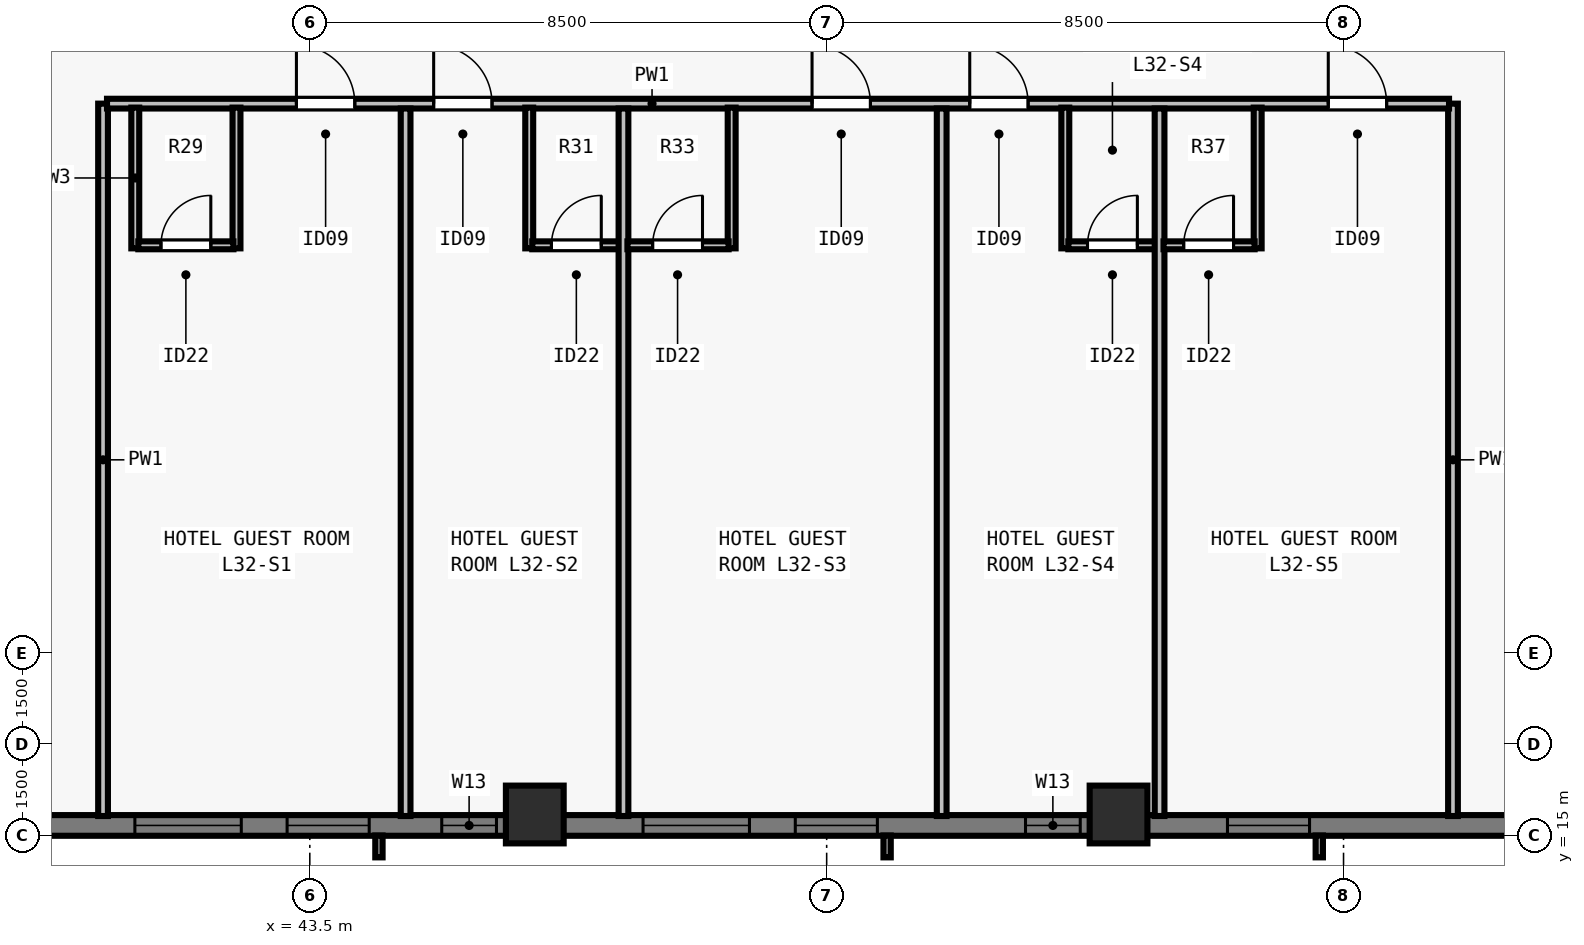
"""IFC4 building model, lengths in metres.
Left out: names, types, materials, properties, quantities, classifications, styles, units other than length and angle.
Written with IfcOpenShell. Run it as: python <this file> out.ifc"""

import sys

from ifc_helpers import new_model, si_unit, direction, frame, frame_2d, origin, origin_2d, place, context, subcontext, project, spatial, rectangle, extrude, element, fill, save


model = new_model("IFC4")
c1 = context("Model", 3, precision=1e-05, world=origin(), true_north=direction((0.0, 1.0)))
c2 = subcontext(c1, "Body", "Model", "MODEL_VIEW")
j1 = project(units=[si_unit("LENGTHUNIT", "METRE"), si_unit("PLANEANGLEUNIT", "RADIAN")], contexts=[c1])
p1 = place(None, origin())
s1 = spatial("IfcSite", under=j1, at=p1, CompositionType="ELEMENT")
p2 = place(p1, origin())
s2 = spatial("IfcBuilding", under=s1, at=p2, CompositionType="ELEMENT")
p3 = place(p2, frame((0.0, 0.0, 120.0)))
s3 = spatial("IfcBuildingStorey", under=s2, at=p3, CompositionType="ELEMENT", Elevation=120.0)
for number, where, z_axis, x_axis in (
    (1, (47.2, 15.35, 0.0), (0.0, 0.0, 1.0), (1.0, 0.0, 0.0)),
    (2, (56.8, 15.35, 0.0), (0.0, 0.0, 1.0), (1.0, 0.0, 0.0)),
):
    element("IfcColumn", number, at=place(p3, frame(where, z_axis=z_axis, x_axis=x_axis)), inside=s3, PredefinedType="COLUMN", context=c2, shape_type="SweptSolid", body=[
        extrude(rectangle(XDim=0.95, YDim=0.95, at=origin_2d()), origin(), (0.0, 0.0, 1.0), 3.5),
    ])
p4 = place(p3, frame((72.0, 15.17, 0.0), z_axis=(0.0, 0.0, 1.0), x_axis=(-1.0, 0.0, 0.0)))
e3 = element("IfcWall", 3, at=p4, inside=s3, PredefinedType="SOLIDWALL", context=c2, shape_type="SweptSolid", body=[
    extrude(rectangle(XDim=39.682, YDim=0.34, at=frame_2d((19.841, 0.0))), origin(), (0.0, 0.0, 1.0), 3.28),
])
p5 = place(p4, frame((5.802, 0.0, 0.8)))
e4 = element("IfcOpeningElement", 4, at=p5, cuts=e3, PredefinedType="OPENING", context=c2, shape_type="SweptSolid", body=[
    extrude(rectangle(XDim=1.35, YDim=1.66, at=frame_2d((0.675, 0.83))), frame((0.0, 0.18, 0.0), z_axis=(0.0, -1.0, 0.0), x_axis=(1.0, 0.0, 0.0)), (0.0, 0.0, 1.0), 0.36),
])
p6 = place(p4, frame((12.059, 0.0, 0.8)))
e5 = element("IfcOpeningElement", 5, at=p6, cuts=e3, PredefinedType="OPENING", context=c2, shape_type="SweptSolid", body=[
    extrude(rectangle(XDim=1.35, YDim=1.66, at=frame_2d((0.675, 0.83))), frame((0.0, 0.18, 0.0), z_axis=(0.0, -1.0, 0.0), x_axis=(1.0, 0.0, 0.0)), (0.0, 0.0, 1.0), 0.36),
])
p7 = place(p4, frame((19.166, 0.0, 0.8)))
e6 = element("IfcOpeningElement", 6, at=p7, cuts=e3, PredefinedType="OPENING", context=c2, shape_type="SweptSolid", body=[
    extrude(rectangle(XDim=1.35, YDim=1.66, at=frame_2d((0.675, 0.83))), frame((0.0, 0.18, 0.0), z_axis=(0.0, -1.0, 0.0), x_axis=(1.0, 0.0, 0.0)), (0.0, 0.0, 1.0), 0.36),
])
p8 = place(p4, frame((21.27, 0.0, 0.8)))
e7 = element("IfcOpeningElement", 7, at=p8, cuts=e3, PredefinedType="OPENING", context=c2, shape_type="SweptSolid", body=[
    extrude(rectangle(XDim=1.75, YDim=1.66, at=frame_2d((0.875, 0.83))), frame((0.0, 0.18, 0.0), z_axis=(0.0, -1.0, 0.0), x_axis=(1.0, 0.0, 0.0)), (0.0, 0.0, 1.0), 0.36),
])
p9 = place(p4, frame((27.523, 0.0, 0.8)))
e8 = element("IfcOpeningElement", 8, at=p9, cuts=e3, PredefinedType="OPENING", context=c2, shape_type="SweptSolid", body=[
    extrude(rectangle(XDim=1.35, YDim=1.66, at=frame_2d((0.675, 0.83))), frame((0.0, 0.18, 0.0), z_axis=(0.0, -1.0, 0.0), x_axis=(1.0, 0.0, 0.0)), (0.0, 0.0, 1.0), 0.36),
])
p10 = place(p4, frame((29.627, 0.0, 0.8)))
e9 = element("IfcOpeningElement", 9, at=p10, cuts=e3, PredefinedType="OPENING", context=c2, shape_type="SweptSolid", body=[
    extrude(rectangle(XDim=1.75, YDim=1.66, at=frame_2d((0.875, 0.83))), frame((0.0, 0.18, 0.0), z_axis=(0.0, -1.0, 0.0), x_axis=(1.0, 0.0, 0.0)), (0.0, 0.0, 1.0), 0.36),
])
p11 = place(p4, frame((25.43, 0.0, 0.8)))
e10 = element("IfcOpeningElement", 10, at=p11, cuts=e3, PredefinedType="OPENING", context=c2, shape_type="SweptSolid", body=[
    extrude(rectangle(XDim=0.9, YDim=1.66, at=frame_2d((0.45, 0.83))), frame((0.0, 0.18, 0.0), z_axis=(0.0, -1.0, 0.0), x_axis=(1.0, 0.0, 0.0)), (0.0, 0.0, 1.0), 0.36),
])
p12 = place(p4, frame((15.83, 0.0, 0.8)))
e11 = element("IfcOpeningElement", 11, at=p12, cuts=e3, PredefinedType="OPENING", context=c2, shape_type="SweptSolid", body=[
    extrude(rectangle(XDim=0.9, YDim=1.66, at=frame_2d((0.45, 0.83))), frame((0.0, 0.18, 0.0), z_axis=(0.0, -1.0, 0.0), x_axis=(1.0, 0.0, 0.0)), (0.0, 0.0, 1.0), 0.36),
])
p13 = place(p4, frame((34.39, 0.0, 0.8)))
e12 = element("IfcOpeningElement", 12, at=p13, cuts=e3, PredefinedType="OPENING", context=c2, shape_type="SweptSolid", body=[
    extrude(rectangle(XDim=0.9, YDim=1.66, at=frame_2d((0.45, 0.83))), frame((0.0, 0.18, 0.0), z_axis=(0.0, -1.0, 0.0), x_axis=(1.0, 0.0, 0.0)), (0.0, 0.0, 1.0), 0.36),
])
p14 = place(p3, frame((40.1, 15.325, 0.0), z_axis=(0.0, 0.0, 1.0), x_axis=(0.0, 1.0, 0.0)))
e13 = element("IfcWall", 13, at=p14, inside=s3, PredefinedType="PARTITIONING", context=c2, shape_type="SweptSolid", body=[
    extrude(rectangle(XDim=11.715, YDim=0.16, at=frame_2d((5.857, 0.0))), origin(), (0.0, 0.0, 1.0), 2.555),
])
p15 = place(p3, frame((62.3, 15.325, 0.0), z_axis=(0.0, 0.0, 1.0), x_axis=(0.0, 1.0, 0.0)))
e14 = element("IfcWall", 14, at=p15, inside=s3, PredefinedType="PARTITIONING", context=c2, shape_type="SweptSolid", body=[
    extrude(rectangle(XDim=11.715, YDim=0.16, at=frame_2d((5.857, 0.0))), origin(), (0.0, 0.0, 1.0), 3.28),
])
p16 = place(p3, frame((40.165, 27.04, 0.0), z_axis=(0.0, 0.0, 1.0), x_axis=(1.0, 0.0, 0.0)))
e15 = element("IfcWall", 15, at=p16, inside=s3, PredefinedType="PARTITIONING", context=c2, shape_type="SweptSolid", body=[
    extrude(rectangle(XDim=22.07, YDim=0.16, at=frame_2d((11.035, 0.0))), origin(), (0.0, 0.0, 1.0), 3.28),
])
p17 = place(p16, frame((3.115, 0.0, 0.0)))
e16 = element("IfcOpeningElement", 16, at=p17, cuts=e15, PredefinedType="OPENING", context=c2, shape_type="SweptSolid", body=[
    extrude(rectangle(XDim=0.96, YDim=2.15, at=frame_2d((0.48, 1.075))), frame((0.0, 0.09, 0.0), z_axis=(0.0, -1.0, 0.0), x_axis=(1.0, 0.0, 0.0)), (0.0, 0.0, 1.0), 0.18),
])
p18 = place(p16, frame((5.372, 0.0, 0.0)))
e17 = element("IfcOpeningElement", 17, at=p18, cuts=e15, PredefinedType="OPENING", context=c2, shape_type="SweptSolid", body=[
    extrude(rectangle(XDim=0.96, YDim=2.15, at=frame_2d((0.48, 1.075))), frame((0.0, 0.09, 0.0), z_axis=(0.0, -1.0, 0.0), x_axis=(1.0, 0.0, 0.0)), (0.0, 0.0, 1.0), 0.18),
])
p19 = place(p16, frame((11.594, 0.0, 0.0)))
e18 = element("IfcOpeningElement", 18, at=p19, cuts=e15, PredefinedType="OPENING", context=c2, shape_type="SweptSolid", body=[
    extrude(rectangle(XDim=0.96, YDim=2.15, at=frame_2d((0.48, 1.075))), frame((0.0, 0.09, 0.0), z_axis=(0.0, -1.0, 0.0), x_axis=(1.0, 0.0, 0.0)), (0.0, 0.0, 1.0), 0.18),
])
p20 = place(p16, frame((14.188, 0.0, 0.0)))
e19 = element("IfcOpeningElement", 19, at=p20, cuts=e15, PredefinedType="OPENING", context=c2, shape_type="SweptSolid", body=[
    extrude(rectangle(XDim=0.96, YDim=2.15, at=frame_2d((0.48, 1.075))), frame((0.0, 0.09, 0.0), z_axis=(0.0, -1.0, 0.0), x_axis=(1.0, 0.0, 0.0)), (0.0, 0.0, 1.0), 0.18),
])
p21 = place(p16, frame((20.084, 0.0, 0.0)))
e20 = element("IfcOpeningElement", 20, at=p21, cuts=e15, PredefinedType="OPENING", context=c2, shape_type="SweptSolid", body=[
    extrude(rectangle(XDim=0.96, YDim=2.15, at=frame_2d((0.48, 1.075))), frame((0.0, 0.09, 0.0), z_axis=(0.0, -1.0, 0.0), x_axis=(1.0, 0.0, 0.0)), (0.0, 0.0, 1.0), 0.18),
])
p22 = place(p3, frame((40.63, 24.66, 0.0), z_axis=(0.0, 0.0, 1.0), x_axis=(0.0, 1.0, 0.0)))
e21 = element("IfcWall", 21, at=p22, inside=s3, PredefinedType="PLUMBINGWALL", context=c2, shape_type="SweptSolid", body=[
    extrude(rectangle(XDim=2.315, YDim=0.13, at=frame_2d((1.158, 0.0))), origin(), (0.0, 0.0, 1.0), 2.555),
])
p23 = place(p3, frame((42.294, 24.66, 0.0), z_axis=(0.0, 0.0, 1.0), x_axis=(0.0, 1.0, 0.0)))
e22 = element("IfcWall", 22, at=p23, inside=s3, PredefinedType="PLUMBINGWALL", context=c2, shape_type="SweptSolid", body=[
    extrude(rectangle(XDim=2.315, YDim=0.13, at=frame_2d((1.158, 0.0))), origin(), (0.0, 0.0, 1.0), 3.28),
])
p24 = place(p3, frame((40.68, 24.71, 0.0), z_axis=(0.0, 0.0, 1.0), x_axis=(1.0, 0.0, 0.0)))
e23 = element("IfcWall", 23, at=p24, inside=s3, PredefinedType="PLUMBINGWALL", context=c2, shape_type="SweptSolid", body=[
    extrude(rectangle(XDim=1.564, YDim=0.13, at=frame_2d((0.782, 0.0))), origin(), (0.0, 0.0, 1.0), 3.28),
])
p25 = place(p24, frame((0.372, 0.0, 0.0)))
e24 = element("IfcOpeningElement", 24, at=p25, cuts=e23, PredefinedType="OPENING", context=c2, shape_type="SweptSolid", body=[
    extrude(rectangle(XDim=0.82, YDim=2.1, at=frame_2d((0.41, 1.05))), frame((0.0, 0.075, 0.0), z_axis=(0.0, -1.0, 0.0), x_axis=(1.0, 0.0, 0.0)), (0.0, 0.0, 1.0), 0.15),
])
p26 = place(p3, frame((45.075, 15.325, 0.0), z_axis=(0.0, 0.0, 1.0), x_axis=(0.0, 1.0, 0.0)))
e25 = element("IfcWall", 25, at=p26, inside=s3, PredefinedType="PARTITIONING", context=c2, shape_type="SweptSolid", body=[
    extrude(rectangle(XDim=11.635, YDim=0.16, at=frame_2d((5.817, 0.0))), origin(), (0.0, 0.0, 1.0), 3.28),
])
p27 = place(p3, frame((47.108, 24.66, 0.0), z_axis=(0.0, 0.0, 1.0), x_axis=(0.0, 1.0, 0.0)))
e26 = element("IfcWall", 26, at=p27, inside=s3, PredefinedType="PLUMBINGWALL", context=c2, shape_type="SweptSolid", body=[
    extrude(rectangle(XDim=2.315, YDim=0.13, at=frame_2d((1.158, 0.0))), origin(), (0.0, 0.0, 1.0), 2.555),
])
p28 = place(p3, frame((47.158, 24.71, 0.0), z_axis=(0.0, 0.0, 1.0), x_axis=(1.0, 0.0, 0.0)))
e27 = element("IfcWall", 27, at=p28, inside=s3, PredefinedType="PLUMBINGWALL", context=c2, shape_type="SweptSolid", body=[
    extrude(rectangle(XDim=1.55, YDim=0.13, at=frame_2d((0.775, 0.0))), origin(), (0.0, 0.0, 1.0), 3.28),
])
p29 = place(p28, frame((0.315, 0.0, 0.0)))
e28 = element("IfcOpeningElement", 28, at=p29, cuts=e27, PredefinedType="OPENING", context=c2, shape_type="SweptSolid", body=[
    extrude(rectangle(XDim=0.82, YDim=2.1, at=frame_2d((0.41, 1.05))), frame((0.0, 0.075, 0.0), z_axis=(0.0, -1.0, 0.0), x_axis=(1.0, 0.0, 0.0)), (0.0, 0.0, 1.0), 0.15),
])
p30 = place(p3, frame((48.658, 15.325, 0.0), z_axis=(0.0, 0.0, 1.0), x_axis=(0.0, 1.0, 0.0)))
e29 = element("IfcWall", 29, at=p30, inside=s3, PredefinedType="PARTITIONING", context=c2, shape_type="SweptSolid", body=[
    extrude(rectangle(XDim=11.635, YDim=0.16, at=frame_2d((5.817, 0.0))), origin(), (0.0, 0.0, 1.0), 2.896),
])
p31 = place(p3, frame((50.438, 24.66, 0.0), z_axis=(0.0, 0.0, 1.0), x_axis=(0.0, 1.0, 0.0)))
e30 = element("IfcWall", 30, at=p31, inside=s3, PredefinedType="PLUMBINGWALL", context=c2, shape_type="SweptSolid", body=[
    extrude(rectangle(XDim=2.315, YDim=0.13, at=frame_2d((1.158, 0.0))), origin(), (0.0, 0.0, 1.0), 3.28),
])
p32 = place(p3, frame((48.723, 24.71, 0.0), z_axis=(0.0, 0.0, 1.0), x_axis=(1.0, 0.0, 0.0)))
e31 = element("IfcWall", 31, at=p32, inside=s3, PredefinedType="PLUMBINGWALL", context=c2, shape_type="SweptSolid", body=[
    extrude(rectangle(XDim=1.664, YDim=0.13, at=frame_2d((0.832, 0.0))), origin(), (0.0, 0.0, 1.0), 3.28),
])
p33 = place(p32, frame((0.415, 0.0, 0.0)))
e32 = element("IfcOpeningElement", 32, at=p33, cuts=e31, PredefinedType="OPENING", context=c2, shape_type="SweptSolid", body=[
    extrude(rectangle(XDim=0.82, YDim=2.1, at=frame_2d((0.41, 1.05))), frame((0.0, 0.075, 0.0), z_axis=(0.0, -1.0, 0.0), x_axis=(1.0, 0.0, 0.0)), (0.0, 0.0, 1.0), 0.15),
])
p34 = place(p3, frame((53.892, 15.325, 0.0), z_axis=(0.0, 0.0, 1.0), x_axis=(0.0, 1.0, 0.0)))
e33 = element("IfcWall", 33, at=p34, inside=s3, PredefinedType="PARTITIONING", context=c2, shape_type="SweptSolid", body=[
    extrude(rectangle(XDim=11.635, YDim=0.16, at=frame_2d((5.817, 0.0))), origin(), (0.0, 0.0, 1.0), 2.896),
])
p35 = place(p3, frame((55.925, 24.66, 0.0), z_axis=(0.0, 0.0, 1.0), x_axis=(0.0, 1.0, 0.0)))
e34 = element("IfcWall", 34, at=p35, inside=s3, PredefinedType="PLUMBINGWALL", context=c2, shape_type="SweptSolid", body=[
    extrude(rectangle(XDim=2.315, YDim=0.13, at=frame_2d((1.158, 0.0))), origin(), (0.0, 0.0, 1.0), 3.28),
])
p36 = place(p3, frame((55.975, 24.71, 0.0), z_axis=(0.0, 0.0, 1.0), x_axis=(1.0, 0.0, 0.0)))
e35 = element("IfcWall", 35, at=p36, inside=s3, PredefinedType="PLUMBINGWALL", context=c2, shape_type="SweptSolid", body=[
    extrude(rectangle(XDim=1.55, YDim=0.13, at=frame_2d((0.775, 0.0))), origin(), (0.0, 0.0, 1.0), 3.28),
])
p37 = place(p36, frame((0.315, 0.0, 0.0)))
e36 = element("IfcOpeningElement", 36, at=p37, cuts=e35, PredefinedType="OPENING", context=c2, shape_type="SweptSolid", body=[
    extrude(rectangle(XDim=0.82, YDim=2.1, at=frame_2d((0.41, 1.05))), frame((0.0, 0.075, 0.0), z_axis=(0.0, -1.0, 0.0), x_axis=(1.0, 0.0, 0.0)), (0.0, 0.0, 1.0), 0.15),
])
p38 = place(p3, frame((57.475, 15.325, 0.0), z_axis=(0.0, 0.0, 1.0), x_axis=(0.0, 1.0, 0.0)))
e37 = element("IfcWall", 37, at=p38, inside=s3, PredefinedType="PARTITIONING", context=c2, shape_type="SweptSolid", body=[
    extrude(rectangle(XDim=11.635, YDim=0.16, at=frame_2d((5.817, 0.0))), origin(), (0.0, 0.0, 1.0), 3.28),
])
p39 = place(p3, frame((59.088, 24.66, 0.0), z_axis=(0.0, 0.0, 1.0), x_axis=(0.0, 1.0, 0.0)))
e38 = element("IfcWall", 38, at=p39, inside=s3, PredefinedType="PLUMBINGWALL", context=c2, shape_type="SweptSolid", body=[
    extrude(rectangle(XDim=2.315, YDim=0.13, at=frame_2d((1.158, 0.0))), origin(), (0.0, 0.0, 1.0), 3.28),
])
p40 = place(p3, frame((57.54, 24.71, 0.0), z_axis=(0.0, 0.0, 1.0), x_axis=(1.0, 0.0, 0.0)))
e39 = element("IfcWall", 39, at=p40, inside=s3, PredefinedType="PLUMBINGWALL", context=c2, shape_type="SweptSolid", body=[
    extrude(rectangle(XDim=1.499, YDim=0.13, at=frame_2d((0.749, 0.0))), origin(), (0.0, 0.0, 1.0), 3.28),
])
p41 = place(p40, frame((0.332, 0.0, 0.0)))
e40 = element("IfcOpeningElement", 40, at=p41, cuts=e39, PredefinedType="OPENING", context=c2, shape_type="SweptSolid", body=[
    extrude(rectangle(XDim=0.82, YDim=2.1, at=frame_2d((0.41, 1.05))), frame((0.0, 0.075, 0.0), z_axis=(0.0, -1.0, 0.0), x_axis=(1.0, 0.0, 0.0)), (0.0, 0.0, 1.0), 0.15),
])
p42 = place(p6, origin())
e41 = element("IfcWindow", 41, at=p42, inside=s3, PartitioningType="SINGLE_PANEL", PredefinedType="WINDOW", context=c2, shape_type="SweptSolid", body=[
    extrude(rectangle(XDim=1.35, YDim=1.66, at=frame_2d((0.675, 0.83))), frame((0.0, -0.05, 0.0), z_axis=(0.0, -1.0, 0.0), x_axis=(1.0, 0.0, 0.0)), (0.0, 0.0, 1.0), 0.06),
])
fill(e5, e41)
p43 = place(p7, origin())
e42 = element("IfcWindow", 42, at=p43, inside=s3, PartitioningType="SINGLE_PANEL", PredefinedType="WINDOW", context=c2, shape_type="SweptSolid", body=[
    extrude(rectangle(XDim=1.35, YDim=1.66, at=frame_2d((0.675, 0.83))), frame((0.0, -0.05, 0.0), z_axis=(0.0, -1.0, 0.0), x_axis=(1.0, 0.0, 0.0)), (0.0, 0.0, 1.0), 0.06),
])
fill(e6, e42)
p44 = place(p8, origin())
e43 = element("IfcWindow", 43, at=p44, inside=s3, PartitioningType="SINGLE_PANEL", PredefinedType="WINDOW", context=c2, shape_type="SweptSolid", body=[
    extrude(rectangle(XDim=1.75, YDim=1.66, at=frame_2d((0.875, 0.83))), frame((0.0, -0.05, 0.0), z_axis=(0.0, -1.0, 0.0), x_axis=(1.0, 0.0, 0.0)), (0.0, 0.0, 1.0), 0.06),
])
fill(e7, e43)
p45 = place(p9, origin())
e44 = element("IfcWindow", 44, at=p45, inside=s3, PartitioningType="SINGLE_PANEL", PredefinedType="WINDOW", context=c2, shape_type="SweptSolid", body=[
    extrude(rectangle(XDim=1.35, YDim=1.66, at=frame_2d((0.675, 0.83))), frame((0.0, -0.05, 0.0), z_axis=(0.0, -1.0, 0.0), x_axis=(1.0, 0.0, 0.0)), (0.0, 0.0, 1.0), 0.06),
])
fill(e8, e44)
p46 = place(p10, origin())
e45 = element("IfcWindow", 45, at=p46, inside=s3, PartitioningType="SINGLE_PANEL", PredefinedType="WINDOW", context=c2, shape_type="SweptSolid", body=[
    extrude(rectangle(XDim=1.75, YDim=1.66, at=frame_2d((0.875, 0.83))), frame((0.0, -0.05, 0.0), z_axis=(0.0, -1.0, 0.0), x_axis=(1.0, 0.0, 0.0)), (0.0, 0.0, 1.0), 0.06),
])
fill(e9, e45)
p47 = place(p11, origin())
e46 = element("IfcWindow", 46, at=p47, inside=s3, PartitioningType="SINGLE_PANEL", PredefinedType="WINDOW", context=c2, shape_type="SweptSolid", body=[
    extrude(rectangle(XDim=0.9, YDim=1.66, at=frame_2d((0.45, 0.83))), frame((0.0, -0.04, 0.0), z_axis=(0.0, -1.0, 0.0), x_axis=(1.0, 0.0, 0.0)), (0.0, 0.0, 1.0), 0.06),
])
fill(e10, e46)
p48 = place(p12, origin())
e47 = element("IfcWindow", 47, at=p48, inside=s3, PartitioningType="SINGLE_PANEL", PredefinedType="WINDOW", context=c2, shape_type="SweptSolid", body=[
    extrude(rectangle(XDim=0.9, YDim=1.66, at=frame_2d((0.45, 0.83))), frame((0.0, -0.04, 0.0), z_axis=(0.0, -1.0, 0.0), x_axis=(1.0, 0.0, 0.0)), (0.0, 0.0, 1.0), 0.06),
])
fill(e11, e47)
p49 = place(p25, origin())
e48 = element("IfcDoor", 48, at=p49, inside=s3, OperationType="SINGLE_SWING_RIGHT", PredefinedType="DOOR", context=c2, shape_type="SweptSolid", body=[
    extrude(rectangle(XDim=0.82, YDim=2.1, at=frame_2d((0.41, 1.05))), frame((0.0, 0.025, 0.0), z_axis=(0.0, -1.0, 0.0), x_axis=(1.0, 0.0, 0.0)), (0.0, 0.0, 1.0), 0.05),
])
fill(e24, e48)
p50 = place(p17, origin())
e49 = element("IfcDoor", 49, at=p50, inside=s3, OperationType="SINGLE_SWING_LEFT", PredefinedType="DOOR", context=c2, shape_type="SweptSolid", body=[
    extrude(rectangle(XDim=0.96, YDim=2.15, at=frame_2d((0.48, 1.075))), frame((0.0, 0.025, 0.0), z_axis=(0.0, -1.0, 0.0), x_axis=(1.0, 0.0, 0.0)), (0.0, 0.0, 1.0), 0.05),
])
fill(e16, e49)
p51 = place(p29, origin())
e50 = element("IfcDoor", 50, at=p51, inside=s3, OperationType="SINGLE_SWING_RIGHT", PredefinedType="DOOR", context=c2, shape_type="SweptSolid", body=[
    extrude(rectangle(XDim=0.82, YDim=2.1, at=frame_2d((0.41, 1.05))), frame((0.0, 0.025, 0.0), z_axis=(0.0, -1.0, 0.0), x_axis=(1.0, 0.0, 0.0)), (0.0, 0.0, 1.0), 0.05),
])
fill(e28, e50)
p52 = place(p18, origin())
e51 = element("IfcDoor", 51, at=p52, inside=s3, OperationType="SINGLE_SWING_LEFT", PredefinedType="DOOR", context=c2, shape_type="SweptSolid", body=[
    extrude(rectangle(XDim=0.96, YDim=2.15, at=frame_2d((0.48, 1.075))), frame((0.0, 0.025, 0.0), z_axis=(0.0, -1.0, 0.0), x_axis=(1.0, 0.0, 0.0)), (0.0, 0.0, 1.0), 0.05),
])
fill(e17, e51)
p53 = place(p33, origin())
e52 = element("IfcDoor", 52, at=p53, inside=s3, OperationType="SINGLE_SWING_RIGHT", PredefinedType="DOOR", context=c2, shape_type="SweptSolid", body=[
    extrude(rectangle(XDim=0.82, YDim=2.1, at=frame_2d((0.41, 1.05))), frame((0.0, 0.025, 0.0), z_axis=(0.0, -1.0, 0.0), x_axis=(1.0, 0.0, 0.0)), (0.0, 0.0, 1.0), 0.05),
])
fill(e32, e52)
p54 = place(p19, origin())
e53 = element("IfcDoor", 53, at=p54, inside=s3, OperationType="SINGLE_SWING_LEFT", PredefinedType="DOOR", context=c2, shape_type="SweptSolid", body=[
    extrude(rectangle(XDim=0.96, YDim=2.15, at=frame_2d((0.48, 1.075))), frame((0.0, 0.025, 0.0), z_axis=(0.0, -1.0, 0.0), x_axis=(1.0, 0.0, 0.0)), (0.0, 0.0, 1.0), 0.05),
])
fill(e18, e53)
p55 = place(p37, origin())
e54 = element("IfcDoor", 54, at=p55, inside=s3, OperationType="SINGLE_SWING_RIGHT", PredefinedType="DOOR", context=c2, shape_type="SweptSolid", body=[
    extrude(rectangle(XDim=0.82, YDim=2.1, at=frame_2d((0.41, 1.05))), frame((0.0, 0.025, 0.0), z_axis=(0.0, -1.0, 0.0), x_axis=(1.0, 0.0, 0.0)), (0.0, 0.0, 1.0), 0.05),
])
fill(e36, e54)
p56 = place(p20, origin())
e55 = element("IfcDoor", 55, at=p56, inside=s3, OperationType="SINGLE_SWING_LEFT", PredefinedType="DOOR", context=c2, shape_type="SweptSolid", body=[
    extrude(rectangle(XDim=0.96, YDim=2.15, at=frame_2d((0.48, 1.075))), frame((0.0, 0.025, 0.0), z_axis=(0.0, -1.0, 0.0), x_axis=(1.0, 0.0, 0.0)), (0.0, 0.0, 1.0), 0.05),
])
fill(e19, e55)
p57 = place(p41, origin())
e56 = element("IfcDoor", 56, at=p57, inside=s3, OperationType="SINGLE_SWING_RIGHT", PredefinedType="DOOR", context=c2, shape_type="SweptSolid", body=[
    extrude(rectangle(XDim=0.82, YDim=2.1, at=frame_2d((0.41, 1.05))), frame((0.0, 0.025, 0.0), z_axis=(0.0, -1.0, 0.0), x_axis=(1.0, 0.0, 0.0)), (0.0, 0.0, 1.0), 0.05),
])
fill(e40, e56)
p58 = place(p21, origin())
e57 = element("IfcDoor", 57, at=p58, inside=s3, OperationType="SINGLE_SWING_LEFT", PredefinedType="DOOR", context=c2, shape_type="SweptSolid", body=[
    extrude(rectangle(XDim=0.96, YDim=2.15, at=frame_2d((0.48, 1.075))), frame((0.0, 0.025, 0.0), z_axis=(0.0, -1.0, 0.0), x_axis=(1.0, 0.0, 0.0)), (0.0, 0.0, 1.0), 0.05),
])
fill(e20, e57)
save(model, sys.argv[1])
